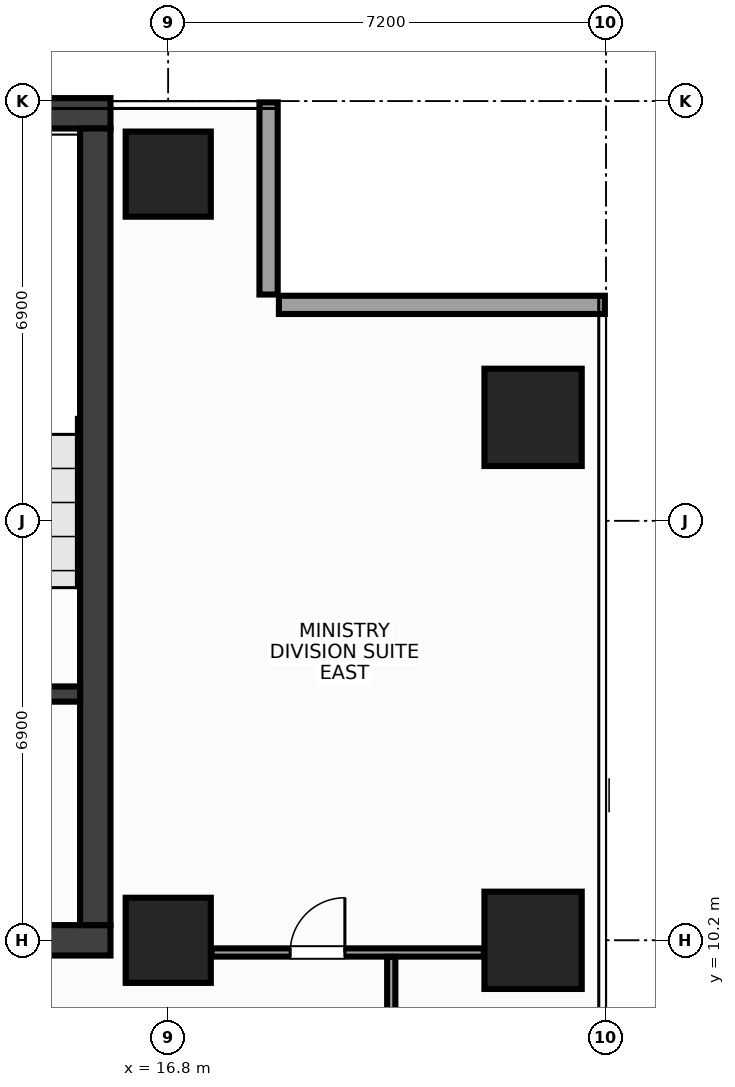
"""IFC4 building model, lengths in metres.
Left out: names, types, materials, properties, quantities, classifications, styles, units other than length and angle.
Written with IfcOpenShell. Run it as: python <this file> out.ifc"""

import sys

from ifc_helpers import new_model, si_unit, direction, frame, frame_2d, origin, origin_2d, place, context, subcontext, project, spatial, rectangle, extrude, source, transform, mapped, element, fill, save


model = new_model("IFC4")
c1 = context("Model", 3, precision=1e-05, world=origin(), true_north=direction((0.0, 1.0)))
c2 = subcontext(c1, "Body", "Model", "MODEL_VIEW")
j1 = project(units=[si_unit("LENGTHUNIT", "METRE"), si_unit("PLANEANGLEUNIT", "RADIAN")], contexts=[c1])
p1 = place(None, origin())
s1 = spatial("IfcSite", under=j1, at=p1, CompositionType="ELEMENT")
p2 = place(p1, origin())
s2 = spatial("IfcBuilding", under=s1, at=p2, CompositionType="ELEMENT")
p3 = place(p2, frame((0.0, 0.0, 200.0)))
s3 = spatial("IfcBuildingStorey", under=s2, at=p3, CompositionType="ELEMENT", Elevation=200.0)
m1 = source(origin(), c2, "Body", "SweptSolid", [
    extrude(rectangle(XDim=31.7, YDim=0.5, at=frame_2d((15.85, 0.0))), origin(), (0.0, 0.0, 1.0), 3.6),
])
p4 = place(p3, frame((-15.85, 23.8, 0.0), z_axis=(0.0, 0.0, 1.0), x_axis=(1.0, 0.0, 0.0)))
e1 = element("IfcWall", 1, at=p4, inside=s3, PredefinedType="SHEAR", context=c2, shape_type="MappedRepresentation", body=[
    mapped(m1, transform((0.0, 0.0, 0.0), x_axis=(1.0, 0.0, 0.0), y_axis=(0.0, 1.0, 0.0), z_axis=(0.0, 0.0, 1.0), scale=1.0)),
])
p5 = place(p3, frame((-15.85, 10.2, 0.0), z_axis=(0.0, 0.0, 1.0), x_axis=(1.0, 0.0, 0.0)))
e2 = element("IfcWall", 2, at=p5, inside=s3, PredefinedType="SHEAR", context=c2, shape_type="MappedRepresentation", body=[
    mapped(m1, transform((0.0, 0.0, 0.0), x_axis=(1.0, 0.0, 0.0), y_axis=(0.0, 1.0, 0.0), z_axis=(0.0, 0.0, 1.0), scale=1.0)),
])
p6 = place(p5, frame((1.7, 0.0, 0.0)))
e3 = element("IfcOpeningElement", 3, at=p6, cuts=e2, PredefinedType="OPENING", context=c2, shape_type="SweptSolid", body=[
    extrude(rectangle(XDim=1.6, YDim=2.15, at=frame_2d((0.8, 1.075))), frame((0.0, 0.262, 0.0), z_axis=(0.0, -1.0, 0.0), x_axis=(1.0, 0.0, 0.0)), (0.0, 0.0, 1.0), 0.524),
])
p7 = place(p5, frame((28.4, 0.0, 0.0)))
e4 = element("IfcOpeningElement", 4, at=p7, cuts=e2, PredefinedType="OPENING", context=c2, shape_type="SweptSolid", body=[
    extrude(rectangle(XDim=1.6, YDim=2.15, at=frame_2d((0.8, 1.075))), frame((0.0, 0.262, 0.0), z_axis=(0.0, -1.0, 0.0), x_axis=(1.0, 0.0, 0.0)), (0.0, 0.0, 1.0), 0.524),
])
p8 = place(p5, frame((15.1, 0.0, 0.0)))
e5 = element("IfcOpeningElement", 5, at=p8, cuts=e2, PredefinedType="OPENING", context=c2, shape_type="SweptSolid", body=[
    extrude(rectangle(XDim=1.5, YDim=2.2, at=frame_2d((0.75, 1.1))), frame((0.0, 0.262, 0.0), z_axis=(0.0, -1.0, 0.0), x_axis=(1.0, 0.0, 0.0)), (0.0, 0.0, 1.0), 0.524),
])
m2 = source(origin(), c2, "Body", "SweptSolid", [
    extrude(rectangle(XDim=13.1, YDim=0.5, at=frame_2d((6.55, 0.0))), origin(), (0.0, 0.0, 1.0), 3.6),
])
p9 = place(p3, frame((15.6, 10.45, 0.0), z_axis=(0.0, 0.0, 1.0), x_axis=(0.0, 1.0, 0.0)))
e6 = element("IfcWall", 6, at=p9, inside=s3, PredefinedType="SHEAR", context=c2, shape_type="MappedRepresentation", body=[
    mapped(m2, transform((0.0, 0.0, 0.0), x_axis=(1.0, 0.0, 0.0), y_axis=(0.0, 1.0, 0.0), z_axis=(0.0, 0.0, 1.0), scale=1.0)),
])
m3 = source(origin(), c2, "Body", "SweptSolid", [
    extrude(rectangle(XDim=3.705, YDim=0.25, at=frame_2d((1.853, 0.0))), origin(), (0.0, 0.0, 1.0), 3.6),
])
p10 = place(p3, frame((11.645, 14.25, 0.0), z_axis=(0.0, 0.0, 1.0), x_axis=(1.0, 0.0, 0.0)))
e7 = element("IfcWall", 7, at=p10, inside=s3, PredefinedType="SHEAR", context=c2, shape_type="MappedRepresentation", body=[
    mapped(m3, transform((0.0, 0.0, 0.0), x_axis=(1.0, 0.0, 0.0), y_axis=(0.0, 1.0, 0.0), z_axis=(0.0, 0.0, 1.0), scale=1.0)),
])
p11 = place(p10, frame((0.95, 0.0, 0.0)))
e8 = element("IfcOpeningElement", 8, at=p11, cuts=e7, PredefinedType="OPENING", context=c2, shape_type="SweptSolid", body=[
    extrude(rectangle(XDim=1.6, YDim=2.15, at=frame_2d((0.8, 1.075))), frame((0.0, 0.137, 0.0), z_axis=(0.0, -1.0, 0.0), x_axis=(1.0, 0.0, 0.0)), (0.0, 0.0, 1.0), 0.274),
])
m4 = source(origin(), c2, "Body", "SweptSolid", [
    extrude(rectangle(XDim=1.4, YDim=1.4, at=origin_2d()), origin(), (0.0, 0.0, 1.0), 3.6),
])
for number, where, z_axis, x_axis in (
    (9, (16.8, 10.2, 0.0), (0.0, 0.0, 1.0), (1.0, 0.0, 0.0)),
    (10, (16.8, 22.8, 0.0), (0.0, 0.0, 1.0), (1.0, 0.0, 0.0)),
):
    element("IfcColumn", number, at=place(p3, frame(where, z_axis=z_axis, x_axis=x_axis)), inside=s3, PredefinedType="COLUMN", context=c2, shape_type="MappedRepresentation", body=[
        mapped(m4, transform((0.0, 0.0, 0.0), x_axis=(1.0, 0.0, 0.0), y_axis=(0.0, 1.0, 0.0), z_axis=(0.0, 0.0, 1.0), scale=1.0)),
    ])
m5 = source(origin(), c2, "Body", "SweptSolid", [
    extrude(rectangle(XDim=1.6, YDim=1.6, at=origin_2d()), origin(), (0.0, 0.0, 1.0), 3.6),
])
for number, where, z_axis, x_axis in (
    (11, (22.8, 10.2, 0.0), (0.0, 0.0, 1.0), (1.0, 0.0, 0.0)),
    (12, (22.8, 18.8, 0.0), (0.0, 0.0, 1.0), (1.0, 0.0, 0.0)),
):
    element("IfcColumn", number, at=place(p3, frame(where, z_axis=z_axis, x_axis=x_axis)), inside=s3, PredefinedType="COLUMN", context=c2, shape_type="MappedRepresentation", body=[
        mapped(m5, transform((0.0, 0.0, 0.0), x_axis=(1.0, 0.0, 0.0), y_axis=(0.0, 1.0, 0.0), z_axis=(0.0, 0.0, 1.0), scale=1.0)),
    ])
m6 = source(origin(), c2, "Body", "SweptSolid", [
    extrude(rectangle(XDim=5.36, YDim=0.3, at=frame_2d((2.68, 0.0))), origin(), (0.0, 0.0, 1.0), 2.76),
])
p12 = place(p3, frame((23.98, 20.65, 0.0), z_axis=(0.0, 0.0, 1.0), x_axis=(-1.0, 0.0, 0.0)))
e13 = element("IfcWall", 13, at=p12, inside=s3, PredefinedType="STANDARD", context=c2, shape_type="MappedRepresentation", body=[
    mapped(m6, transform((0.0, 0.0, 0.0), x_axis=(1.0, 0.0, 0.0), y_axis=(0.0, 1.0, 0.0), z_axis=(0.0, 0.0, 1.0), scale=1.0)),
])
m7 = source(origin(), c2, "Body", "SweptSolid", [
    extrude(rectangle(XDim=3.16, YDim=0.3, at=frame_2d((1.58, 0.0))), origin(), (0.0, 0.0, 1.0), 2.76),
])
p13 = place(p3, frame((18.45, 20.82, 0.0), z_axis=(0.0, 0.0, 1.0), x_axis=(0.0, 1.0, 0.0)))
e14 = element("IfcWall", 14, at=p13, inside=s3, PredefinedType="STANDARD", context=c2, shape_type="MappedRepresentation", body=[
    mapped(m7, transform((0.0, 0.0, 0.0), x_axis=(1.0, 0.0, 0.0), y_axis=(0.0, 1.0, 0.0), z_axis=(0.0, 0.0, 1.0), scale=1.0)),
])
m8 = source(origin(), c2, "Body", "SweptSolid", [
    extrude(rectangle(XDim=4.48, YDim=0.135, at=frame_2d((2.24, 0.0))), origin(), (0.0, 0.0, 1.0), 2.915),
])
p14 = place(p3, frame((17.51, 10.0, 0.0), z_axis=(0.0, 0.0, 1.0), x_axis=(1.0, 0.0, 0.0)))
e15 = element("IfcWall", 15, at=p14, inside=s3, PredefinedType="PARTITIONING", context=c2, shape_type="MappedRepresentation", body=[
    mapped(m8, transform((0.0, 0.0, 0.0), x_axis=(1.0, 0.0, 0.0), y_axis=(0.0, 1.0, 0.0), z_axis=(0.0, 0.0, 1.0), scale=1.0)),
])
p15 = place(p14, frame((1.295, 0.0, 0.0)))
e16 = element("IfcOpeningElement", 16, at=p15, cuts=e15, PredefinedType="OPENING", context=c2, shape_type="SweptSolid", body=[
    extrude(rectangle(XDim=0.9, YDim=2.15, at=frame_2d((0.45, 1.075))), frame((0.0, 0.08, 0.0), z_axis=(0.0, -1.0, 0.0), x_axis=(1.0, 0.0, 0.0)), (0.0, 0.0, 1.0), 0.159),
])
m9 = source(origin(), c2, "Body", "SweptSolid", [
    extrude(rectangle(XDim=2.373, YDim=0.135, at=frame_2d((1.186, 0.0))), origin(), (0.0, 0.0, 1.0), 3.38),
])
p16 = place(p3, frame((20.468, 7.555, 0.0), z_axis=(0.0, 0.0, 1.0), x_axis=(0.0, 1.0, 0.0)))
e17 = element("IfcWall", 17, at=p16, inside=s3, PredefinedType="PARTITIONING", context=c2, shape_type="MappedRepresentation", body=[
    mapped(m9, transform((0.0, 0.0, 0.0), x_axis=(1.0, 0.0, 0.0), y_axis=(0.0, 1.0, 0.0), z_axis=(0.0, 0.0, 1.0), scale=1.0)),
])
m10 = source(origin(), c2, "Body", "SweptSolid", [
    extrude(rectangle(XDim=0.9, YDim=2.15, at=frame_2d((0.45, 1.075))), frame((0.0, 0.025, 0.0), z_axis=(0.0, -1.0, 0.0), x_axis=(1.0, 0.0, 0.0)), (0.0, 0.0, 1.0), 0.05),
])
p17 = place(p15, origin())
e18 = element("IfcDoor", 18, at=p17, inside=s3, OperationType="SINGLE_SWING_RIGHT", PredefinedType="DOOR", context=c2, shape_type="MappedRepresentation", body=[
    mapped(m10, transform((0.0, 0.0, 0.0), x_axis=(1.0, 0.0, 0.0), y_axis=(0.0, 1.0, 0.0), z_axis=(0.0, 0.0, 1.0), scale=1.0)),
])
fill(e16, e18)
save(model, sys.argv[1])
